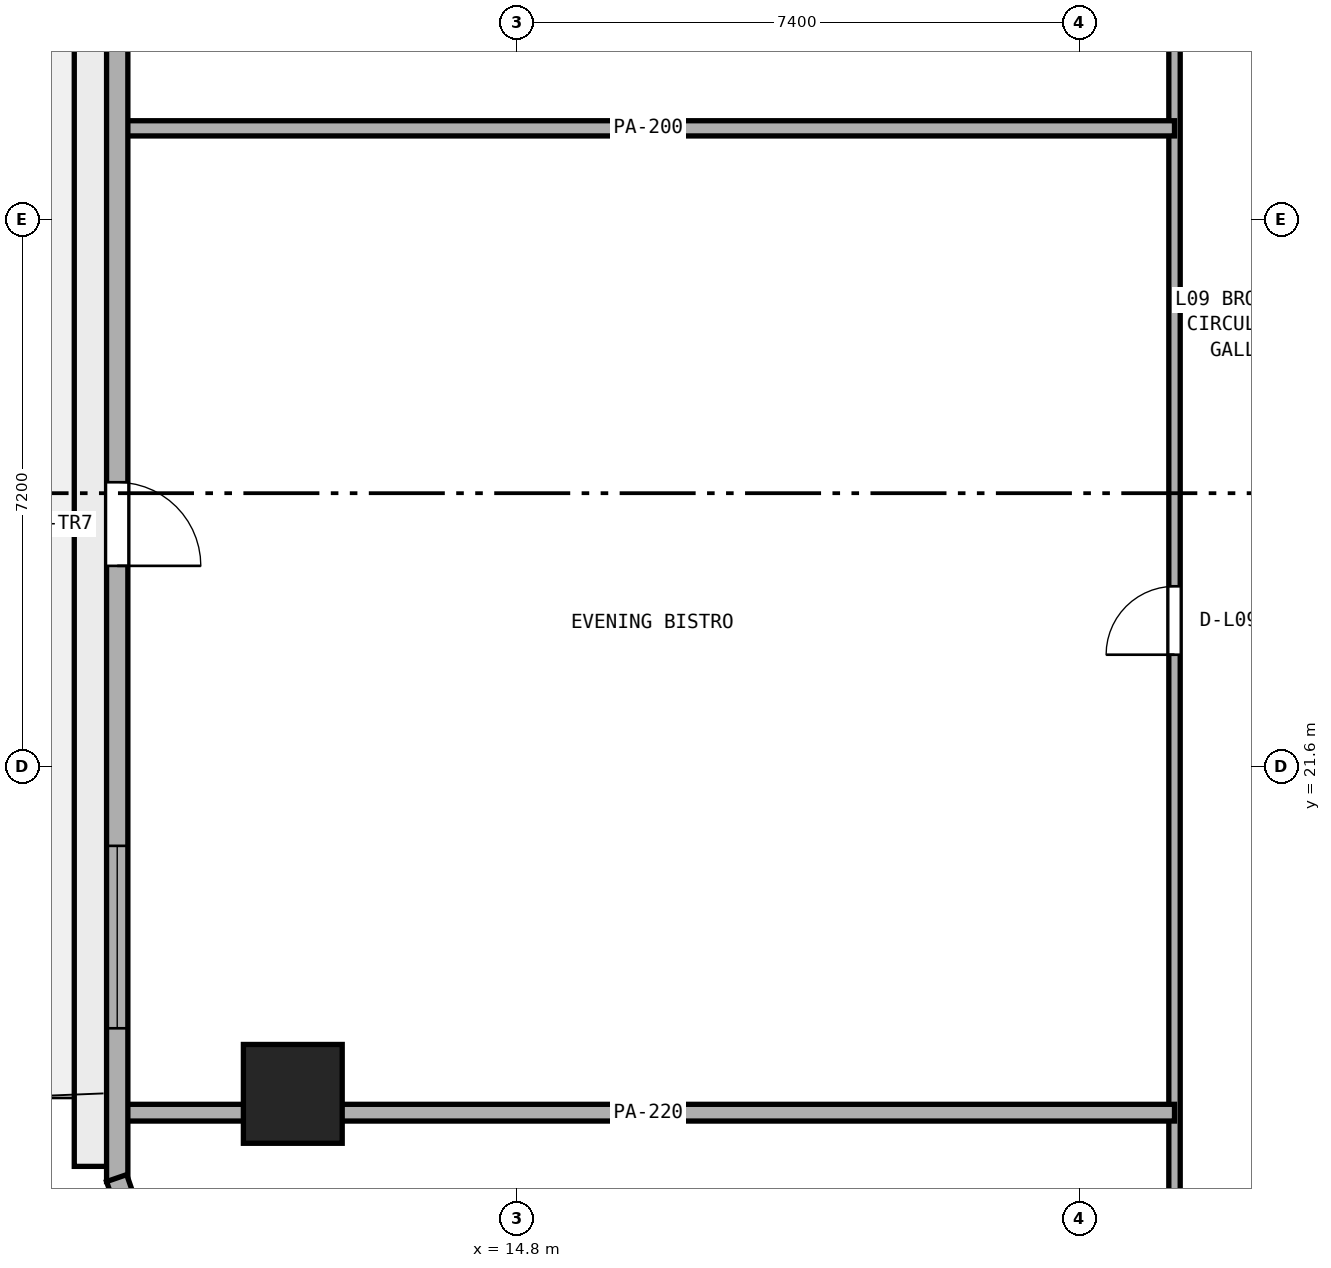
"""IFC4 building model, lengths in metres.
Left out: names, types, materials, properties, quantities, classifications, styles, units other than length and angle.
Written with IfcOpenShell. Run it as: python <this file> out.ifc"""

import sys

from ifc_helpers import new_model, si_unit, direction, frame, frame_2d, origin, origin_2d, place, context, subcontext, project, spatial, rectangle, extrude, element, fill, save


model = new_model("IFC4")
c1 = context("Model", 3, precision=1e-05, world=origin(), true_north=direction((0.0, 1.0)))
c2 = subcontext(c1, "Body", "Model", "MODEL_VIEW")
j1 = project(units=[si_unit("LENGTHUNIT", "METRE"), si_unit("PLANEANGLEUNIT", "RADIAN")], contexts=[c1])
p1 = place(None, origin())
s1 = spatial("IfcSite", under=j1, at=p1, CompositionType="ELEMENT")
p2 = place(p1, origin())
s2 = spatial("IfcBuilding", under=s1, at=p2, CompositionType="ELEMENT")
p3 = place(p2, frame((0.0, 0.0, 40.2)))
s3 = spatial("IfcBuildingStorey", under=s2, at=p3, CompositionType="ELEMENT", Elevation=40.2)
p4 = place(p3, frame((11.85, 17.298, 0.0), z_axis=(0.0, 0.0, 1.0), x_axis=(1.0, 0.0, 0.0)))
e1 = element("IfcColumn", 1, at=p4, inside=s3, PredefinedType="COLUMN", context=c2, shape_type="SweptSolid", body=[
    extrude(rectangle(XDim=1.3, YDim=1.3, at=origin_2d()), origin(), (0.0, 0.0, 1.0), 3.8),
])
p5 = place(p3, frame((23.45, 15.05, 0.0), z_axis=(0.0, 0.0, 1.0), x_axis=(0.0, 1.0, 0.0)))
e2 = element("IfcWall", 2, at=p5, inside=s3, PredefinedType="PARTITIONING", context=c2, shape_type="SweptSolid", body=[
    extrude(rectangle(XDim=20.3, YDim=0.15, at=frame_2d((10.15, 0.0))), origin(), (0.0, 0.0, 1.0), 3.525),
])
p6 = place(p5, frame((8.025, 0.0, 0.0)))
e3 = element("IfcOpeningElement", 3, at=p6, cuts=e2, PredefinedType="OPENING", context=c2, shape_type="SweptSolid", body=[
    extrude(rectangle(XDim=0.9, YDim=2.1, at=frame_2d((0.45, 1.05))), frame((0.0, 0.085, 0.0), z_axis=(0.0, -1.0, 0.0), x_axis=(1.0, 0.0, 0.0)), (0.0, 0.0, 1.0), 0.17),
])
p7 = place(p5, frame((16.175, 0.0, 0.0)))
e4 = element("IfcOpeningElement", 4, at=p7, cuts=e2, PredefinedType="OPENING", context=c2, shape_type="SweptSolid", body=[
    extrude(rectangle(XDim=0.9, YDim=2.1, at=frame_2d((0.45, 1.05))), frame((0.0, 0.085, 0.0), z_axis=(0.0, -1.0, 0.0), x_axis=(1.0, 0.0, 0.0)), (0.0, 0.0, 1.0), 0.17),
])
p8 = place(p3, frame((9.605, 17.05, 0.0), z_axis=(0.0, 0.0, 1.0), x_axis=(1.0, 0.0, 0.0)))
e5 = element("IfcWall", 5, at=p8, inside=s3, PredefinedType="PARTITIONING", context=c2, shape_type="SweptSolid", body=[
    extrude(rectangle(XDim=13.845, YDim=0.22, at=frame_2d((6.922, 0.0))), origin(), (0.0, 0.0, 1.0), 2.908),
])
p9 = place(p3, frame((9.605, 30.0, 0.0), z_axis=(0.0, 0.0, 1.0), x_axis=(1.0, 0.0, 0.0)))
e6 = element("IfcWall", 6, at=p9, inside=s3, PredefinedType="PARTITIONING", context=c2, shape_type="SweptSolid", body=[
    extrude(rectangle(XDim=13.845, YDim=0.2, at=frame_2d((6.922, 0.0))), origin(), (0.0, 0.0, 1.0), 3.525),
])
p10 = place(p3, frame((9.54, 33.444, 0.0), z_axis=(0.0, 0.0, 1.0), x_axis=(0.0, -1.0, 0.0)))
e7 = element("IfcWall", 7, at=p10, inside=s3, PredefinedType="STANDARD", context=c2, shape_type="SweptSolid", body=[
    extrude(rectangle(XDim=17.301, YDim=0.28, at=frame_2d((8.65, 0.0))), origin(), (0.0, 0.0, 1.0), 3.525),
])
p11 = place(p10, frame((8.1, 0.0, 0.0)))
e8 = element("IfcOpeningElement", 8, at=p11, cuts=e7, PredefinedType="OPENING", context=c2, shape_type="SweptSolid", body=[
    extrude(rectangle(XDim=1.1, YDim=2.2, at=frame_2d((0.55, 1.1))), frame((0.0, 0.15, 0.0), z_axis=(0.0, -1.0, 0.0), x_axis=(1.0, 0.0, 0.0)), (0.0, 0.0, 1.0), 0.3),
])
p12 = place(p10, frame((12.884, 0.0, 0.9)))
e9 = element("IfcOpeningElement", 9, at=p12, cuts=e7, PredefinedType="OPENING", context=c2, shape_type="SweptSolid", body=[
    extrude(rectangle(XDim=2.4, YDim=1.75, at=frame_2d((1.2, 0.875))), frame((0.0, 0.15, 0.0), z_axis=(0.0, -1.0, 0.0), x_axis=(1.0, 0.0, 0.0)), (0.0, 0.0, 1.0), 0.3),
])
p13 = place(p3, frame((9.532, 16.189, 0.0), z_axis=(0.0, 0.0, 1.0), x_axis=(0.32708309668, -0.944995580871, 0.0)))
e10 = element("IfcWall", 10, at=p13, inside=s3, PredefinedType="STANDARD", context=c2, shape_type="SweptSolid", body=[
    extrude(rectangle(XDim=2.748, YDim=0.28, at=frame_2d((1.374, 0.0))), origin(), (0.0, 0.0, 1.0), 3.525),
])
p14 = place(p6, origin())
e11 = element("IfcDoor", 11, at=p14, inside=s3, OperationType="SINGLE_SWING_LEFT", PredefinedType="DOOR", context=c2, shape_type="SweptSolid", body=[
    extrude(rectangle(XDim=0.9, YDim=2.1, at=frame_2d((0.45, 1.05))), frame((0.0, 0.025, 0.0), z_axis=(0.0, -1.0, 0.0), x_axis=(1.0, 0.0, 0.0)), (0.0, 0.0, 1.0), 0.05),
])
fill(e3, e11)
p15 = place(p11, origin())
e12 = element("IfcDoor", 12, at=p15, inside=s3, OperationType="SINGLE_SWING_RIGHT", PredefinedType="DOOR", context=c2, shape_type="SweptSolid", body=[
    extrude(rectangle(XDim=1.1, YDim=2.2, at=frame_2d((0.55, 1.1))), frame((0.0, 0.025, 0.0), z_axis=(0.0, -1.0, 0.0), x_axis=(1.0, 0.0, 0.0)), (0.0, 0.0, 1.0), 0.05),
])
fill(e8, e12)
p16 = place(p12, origin())
e13 = element("IfcWindow", 13, at=p16, inside=s3, PartitioningType="SINGLE_PANEL", PredefinedType="WINDOW", context=c2, shape_type="SweptSolid", body=[
    extrude(rectangle(XDim=2.4, YDim=1.75, at=frame_2d((1.2, 0.875))), frame((0.0, 0.03, 0.0), z_axis=(0.0, -1.0, 0.0), x_axis=(1.0, 0.0, 0.0)), (0.0, 0.0, 1.0), 0.06),
])
fill(e9, e13)
save(model, sys.argv[1])
